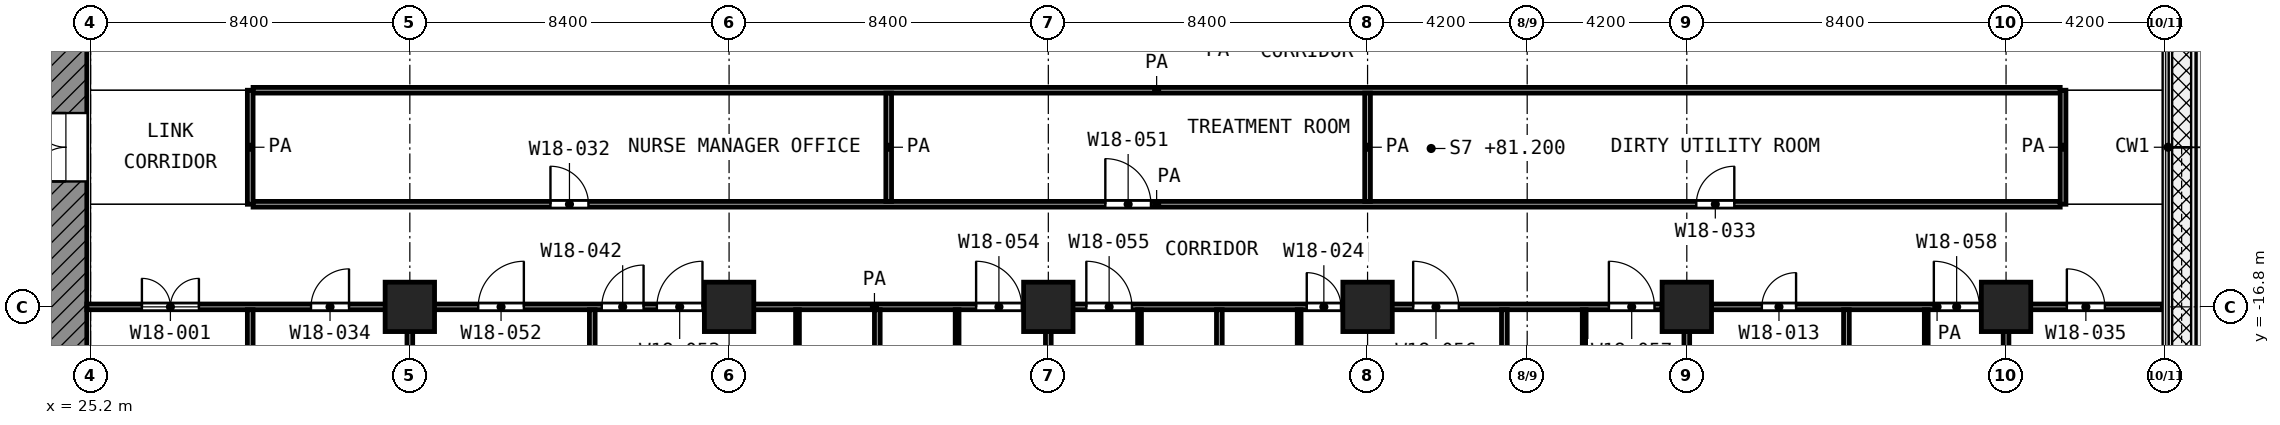
"""IFC4 building model, lengths in metres.
Left out: names, types, materials, properties, quantities, classifications, styles, units other than length and angle.
Written with IfcOpenShell. Run it as: python <this file> out.ifc"""

import sys

from ifc_helpers import new_model, si_unit, direction, frame, frame_2d, origin, origin_2d, place, context, subcontext, project, spatial, rectangle, extrude, element, fill, save


model = new_model("IFC4")
c1 = context("Model", 3, precision=1e-05, world=origin(), true_north=direction((0.0, 1.0)))
c2 = subcontext(c1, "Body", "Model", "MODEL_VIEW")
j1 = project(units=[si_unit("LENGTHUNIT", "METRE"), si_unit("PLANEANGLEUNIT", "RADIAN")], contexts=[c1])
p1 = place(None, origin())
s1 = spatial("IfcSite", under=j1, at=p1, CompositionType="ELEMENT")
p2 = place(p1, origin())
s2 = spatial("IfcBuilding", under=s1, at=p2, CompositionType="ELEMENT")
p3 = place(p2, frame((0.0, 0.0, 81.2)))
s3 = spatial("IfcBuildingStorey", under=s2, at=p3, CompositionType="ELEMENT", Elevation=81.2)
for number, where, z_axis, x_axis in (
    (1, (33.6, -16.8, 0.0), (0.0, 0.0, 1.0), (1.0, 0.0, 0.0)),
    (2, (42.0, -16.8, 0.0), (0.0, 0.0, 1.0), (1.0, 0.0, 0.0)),
    (3, (50.4, -16.8, 0.0), (0.0, 0.0, 1.0), (1.0, 0.0, 0.0)),
    (4, (58.8, -16.8, 0.0), (0.0, 0.0, 1.0), (1.0, 0.0, 0.0)),
    (5, (67.2, -16.8, 0.0), (0.0, 0.0, 1.0), (1.0, 0.0, 0.0)),
    (6, (75.6, -16.8, 0.0), (0.0, 0.0, 1.0), (1.0, 0.0, 0.0)),
):
    element("IfcColumn", number, at=place(p3, frame(where, z_axis=z_axis, x_axis=x_axis)), inside=s3, PredefinedType="COLUMN", context=c2, shape_type="SweptSolid", body=[
        extrude(rectangle(XDim=1.3, YDim=1.3, at=origin_2d()), origin(), (0.0, 0.0, 1.0), 4.2),
    ])
p4 = place(p3, frame((24.55, -24.0, 0.0), z_axis=(0.0, 0.0, 1.0), x_axis=(0.0, 1.0, 0.0)))
e7 = element("IfcWall", 7, at=p4, inside=s3, PredefinedType="SHEAR", context=c2, shape_type="SweptSolid", body=[
    extrude(rectangle(XDim=18.6, YDim=1.1, at=frame_2d((9.3, 0.0))), origin(), (0.0, 0.0, 1.0), 3.9),
])
p5 = place(p4, frame((10.5, 0.0, 0.0)))
e8 = element("IfcOpeningElement", 8, at=p5, cuts=e7, PredefinedType="OPENING", context=c2, shape_type="SweptSolid", body=[
    extrude(rectangle(XDim=1.8, YDim=2.1, at=frame_2d((0.9, 1.05))), frame((0.0, 0.56, 0.0), z_axis=(0.0, -1.0, 0.0), x_axis=(1.0, 0.0, 0.0)), (0.0, 0.0, 1.0), 1.12),
])
p6 = place(p3, frame((43.8, -19.499, 0.0), z_axis=(0.0, 0.0, 1.0), x_axis=(0.0, 1.0, 0.0)))
e9 = element("IfcWall", 9, at=p6, inside=s3, PredefinedType="PARTITIONING", context=c2, shape_type="SweptSolid", body=[
    extrude(rectangle(XDim=2.624, YDim=0.1, at=frame_2d((1.312, 0.0))), origin(), (0.0, 0.0, 1.0), 3.9),
])
p7 = place(p3, frame((48.0, -19.5, 0.0), z_axis=(0.0, 0.0, 1.0), x_axis=(0.0, 1.0, 0.0)))
e10 = element("IfcWall", 10, at=p7, inside=s3, PredefinedType="PARTITIONING", context=c2, shape_type="SweptSolid", body=[
    extrude(rectangle(XDim=2.625, YDim=0.1, at=frame_2d((1.312, 0.0))), origin(), (0.0, 0.0, 1.0), 3.9),
])
p8 = place(p3, frame((52.8, -20.1, 0.0), z_axis=(0.0, 0.0, 1.0), x_axis=(0.0, 1.0, 0.0)))
e11 = element("IfcWall", 11, at=p8, inside=s3, PredefinedType="PARTITIONING", context=c2, shape_type="SweptSolid", body=[
    extrude(rectangle(XDim=3.225, YDim=0.1, at=frame_2d((1.613, 0.0))), origin(), (0.0, 0.0, 1.0), 3.9),
])
p9 = place(p3, frame((57.0, -19.499, 0.0), z_axis=(0.0, 0.0, 1.0), x_axis=(0.0, 1.0, 0.0)))
e12 = element("IfcWall", 12, at=p9, inside=s3, PredefinedType="PARTITIONING", context=c2, shape_type="SweptSolid", body=[
    extrude(rectangle(XDim=2.624, YDim=0.1, at=frame_2d((1.312, 0.0))), origin(), (0.0, 0.0, 1.0), 3.9),
])
p10 = place(p3, frame((64.5, -19.5, 0.0), z_axis=(0.0, 0.0, 1.0), x_axis=(0.0, 1.0, 0.0)))
e13 = element("IfcWall", 13, at=p10, inside=s3, PredefinedType="PARTITIONING", context=c2, shape_type="SweptSolid", body=[
    extrude(rectangle(XDim=2.625, YDim=0.1, at=frame_2d((1.312, 0.0))), origin(), (0.0, 0.0, 1.0), 3.9),
])
p11 = place(p3, frame((73.5, -20.1, 0.0), z_axis=(0.0, 0.0, 1.0), x_axis=(0.0, 1.0, 0.0)))
e14 = element("IfcWall", 14, at=p11, inside=s3, PredefinedType="PARTITIONING", context=c2, shape_type="SweptSolid", body=[
    extrude(rectangle(XDim=3.225, YDim=0.1, at=frame_2d((1.613, 0.0))), origin(), (0.0, 0.0, 1.0), 3.9),
])
p12 = place(p3, frame((25.1, -16.8, 0.0), z_axis=(0.0, 0.0, 1.0), x_axis=(1.0, 0.0, 0.0)))
e15 = element("IfcWall", 15, at=p12, inside=s3, PredefinedType="PARTITIONING", context=c2, shape_type="SweptSolid", body=[
    extrude(rectangle(XDim=41.45, YDim=0.15, at=frame_2d((20.725, 0.0))), origin(), (0.0, 0.0, 1.0), 3.9),
])
p13 = place(p12, frame((1.45, 0.0, 0.0)))
e16 = element("IfcOpeningElement", 16, at=p13, cuts=e15, PredefinedType="OPENING", context=c2, shape_type="SweptSolid", body=[
    extrude(rectangle(XDim=1.5, YDim=2.1, at=frame_2d((0.75, 1.05))), frame((0.0, 0.085, 0.0), z_axis=(0.0, -1.0, 0.0), x_axis=(1.0, 0.0, 0.0)), (0.0, 0.0, 1.0), 0.17),
])
p14 = place(p12, frame((5.9, 0.0, 0.0)))
e17 = element("IfcOpeningElement", 17, at=p14, cuts=e15, PredefinedType="OPENING", context=c2, shape_type="SweptSolid", body=[
    extrude(rectangle(XDim=1.0, YDim=2.1, at=frame_2d((0.5, 1.05))), frame((0.0, 0.085, 0.0), z_axis=(0.0, -1.0, 0.0), x_axis=(1.0, 0.0, 0.0)), (0.0, 0.0, 1.0), 0.17),
])
p15 = place(p12, frame((10.3, 0.0, 0.0)))
e18 = element("IfcOpeningElement", 18, at=p15, cuts=e15, PredefinedType="OPENING", context=c2, shape_type="SweptSolid", body=[
    extrude(rectangle(XDim=1.2, YDim=2.1, at=frame_2d((0.6, 1.05))), frame((0.0, 0.085, 0.0), z_axis=(0.0, -1.0, 0.0), x_axis=(1.0, 0.0, 0.0)), (0.0, 0.0, 1.0), 0.17),
])
p16 = place(p12, frame((15.0, 0.0, 0.0)))
e19 = element("IfcOpeningElement", 19, at=p16, cuts=e15, PredefinedType="OPENING", context=c2, shape_type="SweptSolid", body=[
    extrude(rectangle(XDim=1.2, YDim=2.1, at=frame_2d((0.6, 1.05))), frame((0.0, 0.085, 0.0), z_axis=(0.0, -1.0, 0.0), x_axis=(1.0, 0.0, 0.0)), (0.0, 0.0, 1.0), 0.17),
])
p17 = place(p12, frame((13.55, 0.0, 0.0)))
e20 = element("IfcOpeningElement", 20, at=p17, cuts=e15, PredefinedType="OPENING", context=c2, shape_type="SweptSolid", body=[
    extrude(rectangle(XDim=1.1, YDim=2.1, at=frame_2d((0.55, 1.05))), frame((0.0, 0.085, 0.0), z_axis=(0.0, -1.0, 0.0), x_axis=(1.0, 0.0, 0.0)), (0.0, 0.0, 1.0), 0.17),
])
p18 = place(p12, frame((23.4, 0.0, 0.0)))
e21 = element("IfcOpeningElement", 21, at=p18, cuts=e15, PredefinedType="OPENING", context=c2, shape_type="SweptSolid", body=[
    extrude(rectangle(XDim=1.2, YDim=2.1, at=frame_2d((0.6, 1.05))), frame((0.0, 0.085, 0.0), z_axis=(0.0, -1.0, 0.0), x_axis=(1.0, 0.0, 0.0)), (0.0, 0.0, 1.0), 0.17),
])
p19 = place(p12, frame((26.3, 0.0, 0.0)))
e22 = element("IfcOpeningElement", 22, at=p19, cuts=e15, PredefinedType="OPENING", context=c2, shape_type="SweptSolid", body=[
    extrude(rectangle(XDim=1.2, YDim=2.1, at=frame_2d((0.6, 1.05))), frame((0.0, 0.085, 0.0), z_axis=(0.0, -1.0, 0.0), x_axis=(1.0, 0.0, 0.0)), (0.0, 0.0, 1.0), 0.17),
])
p20 = place(p12, frame((34.9, 0.0, 0.0)))
e23 = element("IfcOpeningElement", 23, at=p20, cuts=e15, PredefinedType="OPENING", context=c2, shape_type="SweptSolid", body=[
    extrude(rectangle(XDim=1.2, YDim=2.1, at=frame_2d((0.6, 1.05))), frame((0.0, 0.085, 0.0), z_axis=(0.0, -1.0, 0.0), x_axis=(1.0, 0.0, 0.0)), (0.0, 0.0, 1.0), 0.17),
])
p21 = place(p12, frame((32.1, 0.0, 0.0)))
e24 = element("IfcOpeningElement", 24, at=p21, cuts=e15, PredefinedType="OPENING", context=c2, shape_type="SweptSolid", body=[
    extrude(rectangle(XDim=0.9, YDim=2.1, at=frame_2d((0.45, 1.05))), frame((0.0, 0.085, 0.0), z_axis=(0.0, -1.0, 0.0), x_axis=(1.0, 0.0, 0.0)), (0.0, 0.0, 1.0), 0.17),
])
p22 = place(p12, frame((40.05, 0.0, 0.0)))
e25 = element("IfcOpeningElement", 25, at=p22, cuts=e15, PredefinedType="OPENING", context=c2, shape_type="SweptSolid", body=[
    extrude(rectangle(XDim=1.2, YDim=2.1, at=frame_2d((0.6, 1.05))), frame((0.0, 0.085, 0.0), z_axis=(0.0, -1.0, 0.0), x_axis=(1.0, 0.0, 0.0)), (0.0, 0.0, 1.0), 0.17),
])
p23 = place(p3, frame((67.85, -16.8, 0.0), z_axis=(0.0, 0.0, 1.0), x_axis=(1.0, 0.0, 0.0)))
e26 = element("IfcWall", 26, at=p23, inside=s3, PredefinedType="PARTITIONING", context=c2, shape_type="SweptSolid", body=[
    extrude(rectangle(XDim=11.87, YDim=0.15, at=frame_2d((5.935, 0.0))), origin(), (0.0, 0.0, 1.0), 3.9),
])
p24 = place(p23, frame((1.325, 0.0, 0.0)))
e27 = element("IfcOpeningElement", 27, at=p24, cuts=e26, PredefinedType="OPENING", context=c2, shape_type="SweptSolid", body=[
    extrude(rectangle(XDim=0.9, YDim=2.1, at=frame_2d((0.45, 1.05))), frame((0.0, 0.085, 0.0), z_axis=(0.0, -1.0, 0.0), x_axis=(1.0, 0.0, 0.0)), (0.0, 0.0, 1.0), 0.17),
])
p25 = place(p23, frame((5.85, 0.0, 0.0)))
e28 = element("IfcOpeningElement", 28, at=p25, cuts=e26, PredefinedType="OPENING", context=c2, shape_type="SweptSolid", body=[
    extrude(rectangle(XDim=1.2, YDim=2.1, at=frame_2d((0.6, 1.05))), frame((0.0, 0.085, 0.0), z_axis=(0.0, -1.0, 0.0), x_axis=(1.0, 0.0, 0.0)), (0.0, 0.0, 1.0), 0.17),
])
p26 = place(p23, frame((9.35, 0.0, 0.0)))
e29 = element("IfcOpeningElement", 29, at=p26, cuts=e26, PredefinedType="OPENING", context=c2, shape_type="SweptSolid", body=[
    extrude(rectangle(XDim=1.0, YDim=2.1, at=frame_2d((0.5, 1.05))), frame((0.0, 0.085, 0.0), z_axis=(0.0, -1.0, 0.0), x_axis=(1.0, 0.0, 0.0)), (0.0, 0.0, 1.0), 0.17),
])
p27 = place(p3, frame((29.475, -14.1, 0.0), z_axis=(0.0, 0.0, 1.0), x_axis=(1.0, 0.0, 0.0)))
e30 = element("IfcWall", 30, at=p27, inside=s3, PredefinedType="PARTITIONING", context=c2, shape_type="SweptSolid", body=[
    extrude(rectangle(XDim=47.55, YDim=0.15, at=frame_2d((23.775, 0.0))), origin(), (0.0, 0.0, 1.0), 3.9),
])
p28 = place(p27, frame((7.825, 0.0, 0.0)))
e31 = element("IfcOpeningElement", 31, at=p28, cuts=e30, PredefinedType="OPENING", context=c2, shape_type="SweptSolid", body=[
    extrude(rectangle(XDim=1.0, YDim=2.1, at=frame_2d((0.5, 1.05))), frame((0.0, 0.085, 0.0), z_axis=(0.0, -1.0, 0.0), x_axis=(1.0, 0.0, 0.0)), (0.0, 0.0, 1.0), 0.17),
])
p29 = place(p27, frame((22.425, 0.0, 0.0)))
e32 = element("IfcOpeningElement", 32, at=p29, cuts=e30, PredefinedType="OPENING", context=c2, shape_type="SweptSolid", body=[
    extrude(rectangle(XDim=1.2, YDim=2.1, at=frame_2d((0.6, 1.05))), frame((0.0, 0.085, 0.0), z_axis=(0.0, -1.0, 0.0), x_axis=(1.0, 0.0, 0.0)), (0.0, 0.0, 1.0), 0.17),
])
p30 = place(p27, frame((37.975, 0.0, 0.0)))
e33 = element("IfcOpeningElement", 33, at=p30, cuts=e30, PredefinedType="OPENING", context=c2, shape_type="SweptSolid", body=[
    extrude(rectangle(XDim=1.0, YDim=2.1, at=frame_2d((0.5, 1.05))), frame((0.0, 0.085, 0.0), z_axis=(0.0, -1.0, 0.0), x_axis=(1.0, 0.0, 0.0)), (0.0, 0.0, 1.0), 0.17),
])
p31 = place(p3, frame((29.475, -11.1, 0.0), z_axis=(0.0, 0.0, 1.0), x_axis=(1.0, 0.0, 0.0)))
e34 = element("IfcWall", 34, at=p31, inside=s3, PredefinedType="PARTITIONING", context=c2, shape_type="SweptSolid", body=[
    extrude(rectangle(XDim=47.55, YDim=0.15, at=frame_2d((23.775, 0.0))), origin(), (0.0, 0.0, 1.0), 3.9),
])
p32 = place(p3, frame((29.4, -25.2, 0.0), z_axis=(0.0, 0.0, 1.0), x_axis=(0.0, 1.0, 0.0)))
e35 = element("IfcWall", 35, at=p32, inside=s3, PredefinedType="PARTITIONING", context=c2, shape_type="SweptSolid", body=[
    extrude(rectangle(XDim=8.325, YDim=0.15, at=frame_2d((4.163, 0.0))), origin(), (0.0, 0.0, 1.0), 3.9),
])
p33 = place(p3, frame((29.4, -14.1, 0.0), z_axis=(0.0, 0.0, 1.0), x_axis=(0.0, 1.0, 0.0)))
e36 = element("IfcWall", 36, at=p33, inside=s3, PredefinedType="PARTITIONING", context=c2, shape_type="SweptSolid", body=[
    extrude(rectangle(XDim=3.0, YDim=0.15, at=frame_2d((1.5, 0.0))), origin(), (0.0, 0.0, 1.0), 3.9),
])
for number, where, z_axis, x_axis in (
    (37, (33.6, -25.12, 0.0), (0.0, 0.0, 1.0), (0.0, 1.0, 0.0)),
    (38, (38.4, -25.12, 0.0), (0.0, 0.0, 1.0), (0.0, 1.0, 0.0)),
    (39, (45.9, -25.12, 0.0), (0.0, 0.0, 1.0), (0.0, 1.0, 0.0)),
):
    element("IfcWall", number, at=place(p3, frame(where, z_axis=z_axis, x_axis=x_axis)), inside=s3, PredefinedType="PARTITIONING", context=c2, shape_type="SweptSolid", body=[
        extrude(rectangle(XDim=8.245, YDim=0.15, at=frame_2d((4.123, 0.0))), origin(), (0.0, 0.0, 1.0), 3.9),
    ])
p34 = place(p3, frame((46.2, -14.025, 0.0), z_axis=(0.0, 0.0, 1.0), x_axis=(0.0, 1.0, 0.0)))
e40 = element("IfcWall", 40, at=p34, inside=s3, PredefinedType="PARTITIONING", context=c2, shape_type="SweptSolid", body=[
    extrude(rectangle(XDim=2.85, YDim=0.15, at=frame_2d((1.425, 0.0))), origin(), (0.0, 0.0, 1.0), 3.9),
])
for number, where, z_axis, x_axis in (
    (41, (50.4, -25.12, 0.0), (0.0, 0.0, 1.0), (0.0, 1.0, 0.0)),
    (42, (54.9, -25.12, 0.0), (0.0, 0.0, 1.0), (0.0, 1.0, 0.0)),
):
    element("IfcWall", number, at=place(p3, frame(where, z_axis=z_axis, x_axis=x_axis)), inside=s3, PredefinedType="PARTITIONING", context=c2, shape_type="SweptSolid", body=[
        extrude(rectangle(XDim=8.245, YDim=0.15, at=frame_2d((4.123, 0.0))), origin(), (0.0, 0.0, 1.0), 3.9),
    ])
p35 = place(p3, frame((58.8, -14.025, 0.0), z_axis=(0.0, 0.0, 1.0), x_axis=(0.0, 1.0, 0.0)))
e43 = element("IfcWall", 43, at=p35, inside=s3, PredefinedType="PARTITIONING", context=c2, shape_type="SweptSolid", body=[
    extrude(rectangle(XDim=2.85, YDim=0.15, at=frame_2d((1.425, 0.0))), origin(), (0.0, 0.0, 1.0), 3.9),
])
p36 = place(p3, frame((62.4, -25.12, 0.0), z_axis=(0.0, 0.0, 1.0), x_axis=(0.0, 1.0, 0.0)))
e44 = element("IfcWall", 44, at=p36, inside=s3, PredefinedType="PARTITIONING", context=c2, shape_type="SweptSolid", body=[
    extrude(rectangle(XDim=8.245, YDim=0.15, at=frame_2d((4.123, 0.0))), origin(), (0.0, 0.0, 1.0), 3.9),
])
p37 = place(p3, frame((67.2, -24.6, 0.0), z_axis=(0.0, 0.0, 1.0), x_axis=(0.0, 1.0, 0.0)))
e45 = element("IfcWall", 45, at=p37, inside=s3, PredefinedType="PARTITIONING", context=c2, shape_type="SweptSolid", body=[
    extrude(rectangle(XDim=7.15, YDim=0.15, at=frame_2d((3.575, 0.0))), origin(), (0.0, 0.0, 1.0), 3.9),
])
p38 = place(p3, frame((71.4, -25.12, 0.0), z_axis=(0.0, 0.0, 1.0), x_axis=(0.0, 1.0, 0.0)))
e46 = element("IfcWall", 46, at=p38, inside=s3, PredefinedType="PARTITIONING", context=c2, shape_type="SweptSolid", body=[
    extrude(rectangle(XDim=8.245, YDim=0.15, at=frame_2d((4.123, 0.0))), origin(), (0.0, 0.0, 1.0), 3.9),
])
p39 = place(p3, frame((75.6, -23.287, 0.0), z_axis=(0.0, 0.0, 1.0), x_axis=(0.0, 1.0, 0.0)))
e47 = element("IfcWall", 47, at=p39, inside=s3, PredefinedType="PARTITIONING", context=c2, shape_type="SweptSolid", body=[
    extrude(rectangle(XDim=6.412, YDim=0.15, at=frame_2d((3.206, 0.0))), origin(), (0.0, 0.0, 1.0), 3.9),
])
p40 = place(p3, frame((77.1, -14.1, 0.0), z_axis=(0.0, 0.0, 1.0), x_axis=(0.0, 1.0, 0.0)))
e48 = element("IfcWall", 48, at=p40, inside=s3, PredefinedType="PARTITIONING", context=c2, shape_type="SweptSolid", body=[
    extrude(rectangle(XDim=3.0, YDim=0.15, at=frame_2d((1.5, 0.0))), origin(), (0.0, 0.0, 1.0), 3.9),
])
p41 = place(p5, origin())
e49 = element("IfcDoor", 49, at=p41, inside=s3, OperationType="DOUBLE_DOOR_SINGLE_SWING", PredefinedType="DOOR", context=c2, shape_type="SweptSolid", body=[
    extrude(rectangle(XDim=1.8, YDim=2.1, at=frame_2d((0.9, 1.05))), frame((0.0, 0.025, 0.0), z_axis=(0.0, -1.0, 0.0), x_axis=(1.0, 0.0, 0.0)), (0.0, 0.0, 1.0), 0.05),
])
fill(e8, e49)
p42 = place(p13, origin())
e50 = element("IfcDoor", 50, at=p42, inside=s3, OperationType="DOUBLE_DOOR_SINGLE_SWING", PredefinedType="DOOR", context=c2, shape_type="SweptSolid", body=[
    extrude(rectangle(XDim=1.5, YDim=2.1, at=frame_2d((0.75, 1.05))), frame((0.0, 0.025, 0.0), z_axis=(0.0, -1.0, 0.0), x_axis=(1.0, 0.0, 0.0)), (0.0, 0.0, 1.0), 0.05),
])
fill(e16, e50)
p43 = place(p28, origin())
e51 = element("IfcDoor", 51, at=p43, inside=s3, OperationType="SINGLE_SWING_LEFT", PredefinedType="DOOR", context=c2, shape_type="SweptSolid", body=[
    extrude(rectangle(XDim=1.0, YDim=2.1, at=frame_2d((0.5, 1.05))), frame((0.0, 0.025, 0.0), z_axis=(0.0, -1.0, 0.0), x_axis=(1.0, 0.0, 0.0)), (0.0, 0.0, 1.0), 0.05),
])
fill(e31, e51)
p44 = place(p29, origin())
e52 = element("IfcDoor", 52, at=p44, inside=s3, OperationType="SINGLE_SWING_LEFT", PredefinedType="DOOR", context=c2, shape_type="SweptSolid", body=[
    extrude(rectangle(XDim=1.2, YDim=2.1, at=frame_2d((0.6, 1.05))), frame((0.0, 0.025, 0.0), z_axis=(0.0, -1.0, 0.0), x_axis=(1.0, 0.0, 0.0)), (0.0, 0.0, 1.0), 0.05),
])
fill(e32, e52)
p45 = place(p30, origin())
e53 = element("IfcDoor", 53, at=p45, inside=s3, OperationType="SINGLE_SWING_RIGHT", PredefinedType="DOOR", context=c2, shape_type="SweptSolid", body=[
    extrude(rectangle(XDim=1.0, YDim=2.1, at=frame_2d((0.5, 1.05))), frame((0.0, 0.025, 0.0), z_axis=(0.0, -1.0, 0.0), x_axis=(1.0, 0.0, 0.0)), (0.0, 0.0, 1.0), 0.05),
])
fill(e33, e53)
p46 = place(p14, origin())
e54 = element("IfcDoor", 54, at=p46, inside=s3, OperationType="SINGLE_SWING_RIGHT", PredefinedType="DOOR", context=c2, shape_type="SweptSolid", body=[
    extrude(rectangle(XDim=1.0, YDim=2.1, at=frame_2d((0.5, 1.05))), frame((0.0, 0.025, 0.0), z_axis=(0.0, -1.0, 0.0), x_axis=(1.0, 0.0, 0.0)), (0.0, 0.0, 1.0), 0.05),
])
fill(e17, e54)
p47 = place(p15, origin())
e55 = element("IfcDoor", 55, at=p47, inside=s3, OperationType="SINGLE_SWING_RIGHT", PredefinedType="DOOR", context=c2, shape_type="SweptSolid", body=[
    extrude(rectangle(XDim=1.2, YDim=2.1, at=frame_2d((0.6, 1.05))), frame((0.0, 0.025, 0.0), z_axis=(0.0, -1.0, 0.0), x_axis=(1.0, 0.0, 0.0)), (0.0, 0.0, 1.0), 0.05),
])
fill(e18, e55)
p48 = place(p16, origin())
e56 = element("IfcDoor", 56, at=p48, inside=s3, OperationType="SINGLE_SWING_RIGHT", PredefinedType="DOOR", context=c2, shape_type="SweptSolid", body=[
    extrude(rectangle(XDim=1.2, YDim=2.1, at=frame_2d((0.6, 1.05))), frame((0.0, 0.025, 0.0), z_axis=(0.0, -1.0, 0.0), x_axis=(1.0, 0.0, 0.0)), (0.0, 0.0, 1.0), 0.05),
])
fill(e19, e56)
p49 = place(p17, origin())
e57 = element("IfcDoor", 57, at=p49, inside=s3, OperationType="SINGLE_SWING_RIGHT", PredefinedType="DOOR", context=c2, shape_type="SweptSolid", body=[
    extrude(rectangle(XDim=1.1, YDim=2.1, at=frame_2d((0.55, 1.05))), frame((0.0, 0.025, 0.0), z_axis=(0.0, -1.0, 0.0), x_axis=(1.0, 0.0, 0.0)), (0.0, 0.0, 1.0), 0.05),
])
fill(e20, e57)
p50 = place(p18, origin())
e58 = element("IfcDoor", 58, at=p50, inside=s3, OperationType="SINGLE_SWING_LEFT", PredefinedType="DOOR", context=c2, shape_type="SweptSolid", body=[
    extrude(rectangle(XDim=1.2, YDim=2.1, at=frame_2d((0.6, 1.05))), frame((0.0, 0.025, 0.0), z_axis=(0.0, -1.0, 0.0), x_axis=(1.0, 0.0, 0.0)), (0.0, 0.0, 1.0), 0.05),
])
fill(e21, e58)
p51 = place(p19, origin())
e59 = element("IfcDoor", 59, at=p51, inside=s3, OperationType="SINGLE_SWING_LEFT", PredefinedType="DOOR", context=c2, shape_type="SweptSolid", body=[
    extrude(rectangle(XDim=1.2, YDim=2.1, at=frame_2d((0.6, 1.05))), frame((0.0, 0.025, 0.0), z_axis=(0.0, -1.0, 0.0), x_axis=(1.0, 0.0, 0.0)), (0.0, 0.0, 1.0), 0.05),
])
fill(e22, e59)
p52 = place(p20, origin())
e60 = element("IfcDoor", 60, at=p52, inside=s3, OperationType="SINGLE_SWING_LEFT", PredefinedType="DOOR", context=c2, shape_type="SweptSolid", body=[
    extrude(rectangle(XDim=1.2, YDim=2.1, at=frame_2d((0.6, 1.05))), frame((0.0, 0.025, 0.0), z_axis=(0.0, -1.0, 0.0), x_axis=(1.0, 0.0, 0.0)), (0.0, 0.0, 1.0), 0.05),
])
fill(e23, e60)
p53 = place(p21, origin())
e61 = element("IfcDoor", 61, at=p53, inside=s3, OperationType="SINGLE_SWING_LEFT", PredefinedType="DOOR", context=c2, shape_type="SweptSolid", body=[
    extrude(rectangle(XDim=0.9, YDim=2.1, at=frame_2d((0.45, 1.05))), frame((0.0, 0.025, 0.0), z_axis=(0.0, -1.0, 0.0), x_axis=(1.0, 0.0, 0.0)), (0.0, 0.0, 1.0), 0.05),
])
fill(e24, e61)
p54 = place(p22, origin())
e62 = element("IfcDoor", 62, at=p54, inside=s3, OperationType="SINGLE_SWING_LEFT", PredefinedType="DOOR", context=c2, shape_type="SweptSolid", body=[
    extrude(rectangle(XDim=1.2, YDim=2.1, at=frame_2d((0.6, 1.05))), frame((0.0, 0.025, 0.0), z_axis=(0.0, -1.0, 0.0), x_axis=(1.0, 0.0, 0.0)), (0.0, 0.0, 1.0), 0.05),
])
fill(e25, e62)
p55 = place(p24, origin())
e63 = element("IfcDoor", 63, at=p55, inside=s3, OperationType="SINGLE_SWING_RIGHT", PredefinedType="DOOR", context=c2, shape_type="SweptSolid", body=[
    extrude(rectangle(XDim=0.9, YDim=2.1, at=frame_2d((0.45, 1.05))), frame((0.0, 0.025, 0.0), z_axis=(0.0, -1.0, 0.0), x_axis=(1.0, 0.0, 0.0)), (0.0, 0.0, 1.0), 0.05),
])
fill(e27, e63)
p56 = place(p25, origin())
e64 = element("IfcDoor", 64, at=p56, inside=s3, OperationType="SINGLE_SWING_LEFT", PredefinedType="DOOR", context=c2, shape_type="SweptSolid", body=[
    extrude(rectangle(XDim=1.2, YDim=2.1, at=frame_2d((0.6, 1.05))), frame((0.0, 0.025, 0.0), z_axis=(0.0, -1.0, 0.0), x_axis=(1.0, 0.0, 0.0)), (0.0, 0.0, 1.0), 0.05),
])
fill(e28, e64)
p57 = place(p26, origin())
e65 = element("IfcDoor", 65, at=p57, inside=s3, OperationType="SINGLE_SWING_LEFT", PredefinedType="DOOR", context=c2, shape_type="SweptSolid", body=[
    extrude(rectangle(XDim=1.0, YDim=2.1, at=frame_2d((0.5, 1.05))), frame((0.0, 0.025, 0.0), z_axis=(0.0, -1.0, 0.0), x_axis=(1.0, 0.0, 0.0)), (0.0, 0.0, 1.0), 0.05),
])
fill(e29, e65)
save(model, sys.argv[1])
